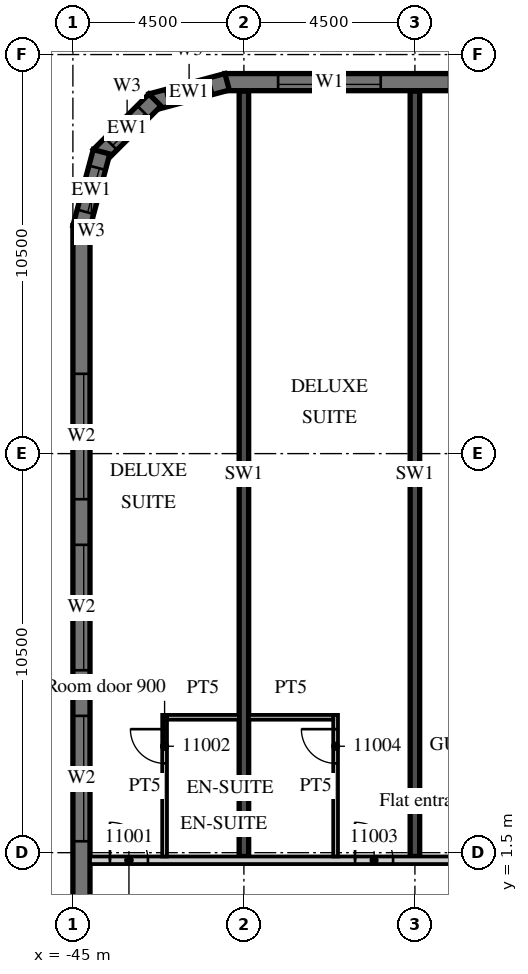
"""IFC4 building model, lengths in metres.
Left out: names, types, materials, properties, quantities, classifications, styles, units other than length and angle.
Written with IfcOpenShell. Run it as: python <this file> out.ifc"""

import sys

from ifc_helpers import new_model, si_unit, direction, frame, frame_2d, origin, place, context, subcontext, project, spatial, polyline, rectangle, outline, extrude, element, fill, save


model = new_model("IFC4")
c1 = context("Model", 3, precision=1e-05, world=origin(), true_north=direction((0.0, 1.0)))
c2 = subcontext(c1, "Body", "Model", "MODEL_VIEW")
j1 = project(units=[si_unit("LENGTHUNIT", "METRE"), si_unit("PLANEANGLEUNIT", "RADIAN")], contexts=[c1])
p1 = place(None, origin())
s1 = spatial("IfcSite", under=j1, at=p1, CompositionType="ELEMENT")
p2 = place(p1, origin())
s2 = spatial("IfcBuilding", under=s1, at=p2, CompositionType="ELEMENT")
p3 = place(p2, frame((0.0, 0.0, 66.6)))
s3 = spatial("IfcBuildingStorey", under=s2, at=p3, CompositionType="ELEMENT", Elevation=66.6)
for number, where, z_axis, x_axis in (
    (1, (-40.5, 1.4, 0.0), (0.0, 0.0, 1.0), (0.0, 1.0, 0.0)),
    (2, (-36.0, 1.4, 0.0), (0.0, 0.0, 1.0), (0.0, 1.0, 0.0)),
):
    element("IfcWall", number, at=place(p3, frame(where, z_axis=z_axis, x_axis=x_axis)), inside=s3, PredefinedType="SHEAR", context=c2, shape_type="SweptSolid", body=[
        extrude(rectangle(XDim=20.14, YDim=0.25, at=frame_2d((10.07, 0.0))), origin(), (0.0, 0.0, 1.0), 3.3),
    ])
p4 = place(p3, frame((13.5, 21.775, 0.0), z_axis=(0.0, 0.0, 1.0), x_axis=(-1.0, 0.0, 0.0)))
e3 = element("IfcWall", 3, at=p4, inside=s3, PredefinedType="SOLIDWALL", context=c2, shape_type="SweptSolid", body=[
    extrude(rectangle(XDim=54.5, YDim=0.45, at=frame_2d((27.25, 0.0))), origin(), (0.0, 0.0, 1.0), 3.02),
])
p5 = place(p4, frame((0.9, 0.0, 0.45)))
e4 = element("IfcOpeningElement", 4, at=p5, cuts=e3, PredefinedType="OPENING", context=c2, shape_type="SweptSolid", body=[
    extrude(rectangle(XDim=2.7, YDim=2.25, at=frame_2d((1.35, 1.125))), frame((0.0, 0.235, 0.0), z_axis=(0.0, -1.0, 0.0), x_axis=(1.0, 0.0, 0.0)), (0.0, 0.0, 1.0), 0.47),
])
p6 = place(p4, frame((5.4, 0.0, 0.45)))
e5 = element("IfcOpeningElement", 5, at=p6, cuts=e3, PredefinedType="OPENING", context=c2, shape_type="SweptSolid", body=[
    extrude(rectangle(XDim=2.7, YDim=2.25, at=frame_2d((1.35, 1.125))), frame((0.0, 0.235, 0.0), z_axis=(0.0, -1.0, 0.0), x_axis=(1.0, 0.0, 0.0)), (0.0, 0.0, 1.0), 0.47),
])
p7 = place(p4, frame((9.9, 0.0, 0.45)))
e6 = element("IfcOpeningElement", 6, at=p7, cuts=e3, PredefinedType="OPENING", context=c2, shape_type="SweptSolid", body=[
    extrude(rectangle(XDim=2.7, YDim=2.25, at=frame_2d((1.35, 1.125))), frame((0.0, 0.235, 0.0), z_axis=(0.0, -1.0, 0.0), x_axis=(1.0, 0.0, 0.0)), (0.0, 0.0, 1.0), 0.47),
])
p8 = place(p4, frame((14.4, 0.0, 0.45)))
e7 = element("IfcOpeningElement", 7, at=p8, cuts=e3, PredefinedType="OPENING", context=c2, shape_type="SweptSolid", body=[
    extrude(rectangle(XDim=2.7, YDim=2.25, at=frame_2d((1.35, 1.125))), frame((0.0, 0.235, 0.0), z_axis=(0.0, -1.0, 0.0), x_axis=(1.0, 0.0, 0.0)), (0.0, 0.0, 1.0), 0.47),
])
p9 = place(p4, frame((18.9, 0.0, 0.45)))
e8 = element("IfcOpeningElement", 8, at=p9, cuts=e3, PredefinedType="OPENING", context=c2, shape_type="SweptSolid", body=[
    extrude(rectangle(XDim=2.7, YDim=2.25, at=frame_2d((1.35, 1.125))), frame((0.0, 0.235, 0.0), z_axis=(0.0, -1.0, 0.0), x_axis=(1.0, 0.0, 0.0)), (0.0, 0.0, 1.0), 0.47),
])
p10 = place(p4, frame((23.4, 0.0, 0.45)))
e9 = element("IfcOpeningElement", 9, at=p10, cuts=e3, PredefinedType="OPENING", context=c2, shape_type="SweptSolid", body=[
    extrude(rectangle(XDim=2.7, YDim=2.25, at=frame_2d((1.35, 1.125))), frame((0.0, 0.235, 0.0), z_axis=(0.0, -1.0, 0.0), x_axis=(1.0, 0.0, 0.0)), (0.0, 0.0, 1.0), 0.47),
])
p11 = place(p4, frame((27.9, 0.0, 0.45)))
e10 = element("IfcOpeningElement", 10, at=p11, cuts=e3, PredefinedType="OPENING", context=c2, shape_type="SweptSolid", body=[
    extrude(rectangle(XDim=2.7, YDim=2.25, at=frame_2d((1.35, 1.125))), frame((0.0, 0.235, 0.0), z_axis=(0.0, -1.0, 0.0), x_axis=(1.0, 0.0, 0.0)), (0.0, 0.0, 1.0), 0.47),
])
p12 = place(p4, frame((32.4, 0.0, 0.45)))
e11 = element("IfcOpeningElement", 11, at=p12, cuts=e3, PredefinedType="OPENING", context=c2, shape_type="SweptSolid", body=[
    extrude(rectangle(XDim=2.7, YDim=2.25, at=frame_2d((1.35, 1.125))), frame((0.0, 0.235, 0.0), z_axis=(0.0, -1.0, 0.0), x_axis=(1.0, 0.0, 0.0)), (0.0, 0.0, 1.0), 0.47),
])
p13 = place(p4, frame((36.9, 0.0, 0.45)))
e12 = element("IfcOpeningElement", 12, at=p13, cuts=e3, PredefinedType="OPENING", context=c2, shape_type="SweptSolid", body=[
    extrude(rectangle(XDim=2.7, YDim=2.25, at=frame_2d((1.35, 1.125))), frame((0.0, 0.235, 0.0), z_axis=(0.0, -1.0, 0.0), x_axis=(1.0, 0.0, 0.0)), (0.0, 0.0, 1.0), 0.47),
])
p14 = place(p4, frame((41.4, 0.0, 0.45)))
e13 = element("IfcOpeningElement", 13, at=p14, cuts=e3, PredefinedType="OPENING", context=c2, shape_type="SweptSolid", body=[
    extrude(rectangle(XDim=2.7, YDim=2.25, at=frame_2d((1.35, 1.125))), frame((0.0, 0.235, 0.0), z_axis=(0.0, -1.0, 0.0), x_axis=(1.0, 0.0, 0.0)), (0.0, 0.0, 1.0), 0.47),
])
p15 = place(p4, frame((45.9, 0.0, 0.45)))
e14 = element("IfcOpeningElement", 14, at=p15, cuts=e3, PredefinedType="OPENING", context=c2, shape_type="SweptSolid", body=[
    extrude(rectangle(XDim=2.7, YDim=2.25, at=frame_2d((1.35, 1.125))), frame((0.0, 0.235, 0.0), z_axis=(0.0, -1.0, 0.0), x_axis=(1.0, 0.0, 0.0)), (0.0, 0.0, 1.0), 0.47),
])
p16 = place(p4, frame((50.4, 0.0, 0.45)))
e15 = element("IfcOpeningElement", 15, at=p16, cuts=e3, PredefinedType="OPENING", context=c2, shape_type="SweptSolid", body=[
    extrude(rectangle(XDim=2.7, YDim=2.25, at=frame_2d((1.35, 1.125))), frame((0.0, 0.235, 0.0), z_axis=(0.0, -1.0, 0.0), x_axis=(1.0, 0.0, 0.0)), (0.0, 0.0, 1.0), 0.47),
])
p17 = place(p3, frame((-40.942, 21.783, 0.0), z_axis=(0.0, 0.0, 1.0), x_axis=(-0.965926999034, -0.25881466832, 0.0)))
e16 = element("IfcWall", 16, at=p17, inside=s3, PredefinedType="SOLIDWALL", context=c2, shape_type="SweptSolid", body=[
    extrude(outline(polyline([(0.0, -0.225), (2.071, -0.225), (1.95, 0.225), (0.121, 0.225), (0.0, -0.225)])), origin(), (0.0, 0.0, 1.0), 3.02),
])
p18 = place(p17, frame((0.435, 0.0, 0.45)))
e17 = element("IfcOpeningElement", 17, at=p18, cuts=e16, PredefinedType="OPENING", context=c2, shape_type="SweptSolid", body=[
    extrude(rectangle(XDim=1.2, YDim=2.25, at=frame_2d((0.6, 1.125))), frame((0.0, 0.235, 0.0), z_axis=(0.0, -1.0, 0.0), x_axis=(1.0, 0.0, 0.0)), (0.0, 0.0, 1.0), 0.47),
])
p19 = place(p3, frame((-42.841, 21.305, 0.0), z_axis=(0.0, 0.0, 1.0), x_axis=(-0.707106781187, -0.707106781187, 0.0)))
e18 = element("IfcWall", 18, at=p19, inside=s3, PredefinedType="SOLIDWALL", context=c2, shape_type="SweptSolid", body=[
    extrude(outline(polyline([(0.0, -0.225), (2.071, -0.225), (1.95, 0.225), (0.121, 0.225), (0.0, -0.225)])), origin(), (0.0, 0.0, 1.0), 3.02),
])
p20 = place(p19, frame((0.435, 0.0, 0.45)))
e19 = element("IfcOpeningElement", 19, at=p20, cuts=e18, PredefinedType="OPENING", context=c2, shape_type="SweptSolid", body=[
    extrude(rectangle(XDim=1.2, YDim=2.25, at=frame_2d((0.6, 1.125))), frame((0.0, 0.235, 0.0), z_axis=(0.0, -1.0, 0.0), x_axis=(1.0, 0.0, 0.0)), (0.0, 0.0, 1.0), 0.47),
])
p21 = place(p3, frame((-44.247, 19.942, 0.0), z_axis=(0.0, 0.0, 1.0), x_axis=(-0.25881466832, -0.965926999034, 0.0)))
e20 = element("IfcWall", 20, at=p21, inside=s3, PredefinedType="SOLIDWALL", context=c2, shape_type="SweptSolid", body=[
    extrude(outline(polyline([(-0.0, -0.225), (2.07, -0.225), (1.95, 0.225), (0.12, 0.225), (-0.0, -0.225)])), origin(), (0.0, 0.0, 1.0), 3.02),
])
p22 = place(p21, frame((0.435, 0.0, 0.45)))
e21 = element("IfcOpeningElement", 21, at=p22, cuts=e20, PredefinedType="OPENING", context=c2, shape_type="SweptSolid", body=[
    extrude(rectangle(XDim=1.2, YDim=2.25, at=frame_2d((0.6, 1.125))), frame((0.0, 0.235, 0.0), z_axis=(0.0, -1.0, 0.0), x_axis=(1.0, 0.0, 0.0)), (0.0, 0.0, 1.0), 0.47),
])
p23 = place(p3, frame((-44.775, 18.0, 0.0), z_axis=(0.0, 0.0, 1.0), x_axis=(0.0, -1.0, 0.0)))
e22 = element("IfcWall", 22, at=p23, inside=s3, PredefinedType="SOLIDWALL", context=c2, shape_type="SweptSolid", body=[
    extrude(rectangle(XDim=36.0, YDim=0.45, at=frame_2d((18.0, 0.0))), origin(), (0.0, 0.0, 1.0), 3.02),
])
p24 = place(p23, frame((3.9, 0.0, 0.45)))
e23 = element("IfcOpeningElement", 23, at=p24, cuts=e22, PredefinedType="OPENING", context=c2, shape_type="SweptSolid", body=[
    extrude(rectangle(XDim=3.3, YDim=2.25, at=frame_2d((1.65, 1.125))), frame((0.0, 0.235, 0.0), z_axis=(0.0, -1.0, 0.0), x_axis=(1.0, 0.0, 0.0)), (0.0, 0.0, 1.0), 0.47),
])
p25 = place(p23, frame((8.4, 0.0, 0.45)))
e24 = element("IfcOpeningElement", 24, at=p25, cuts=e22, PredefinedType="OPENING", context=c2, shape_type="SweptSolid", body=[
    extrude(rectangle(XDim=3.3, YDim=2.25, at=frame_2d((1.65, 1.125))), frame((0.0, 0.235, 0.0), z_axis=(0.0, -1.0, 0.0), x_axis=(1.0, 0.0, 0.0)), (0.0, 0.0, 1.0), 0.47),
])
p26 = place(p23, frame((12.9, 0.0, 0.45)))
e25 = element("IfcOpeningElement", 25, at=p26, cuts=e22, PredefinedType="OPENING", context=c2, shape_type="SweptSolid", body=[
    extrude(rectangle(XDim=3.3, YDim=2.25, at=frame_2d((1.65, 1.125))), frame((0.0, 0.235, 0.0), z_axis=(0.0, -1.0, 0.0), x_axis=(1.0, 0.0, 0.0)), (0.0, 0.0, 1.0), 0.47),
])
p27 = place(p3, frame((-44.55, 1.3, 0.0), z_axis=(0.0, 0.0, 1.0), x_axis=(1.0, 0.0, 0.0)))
e26 = element("IfcWall", 26, at=p27, inside=s3, PredefinedType="PARTITIONING", context=c2, shape_type="SweptSolid", body=[
    extrude(rectangle(XDim=58.05, YDim=0.2, at=frame_2d((29.025, 0.0))), origin(), (0.0, 0.0, 1.0), 3.02),
])
p28 = place(p27, frame((0.525, 0.0, 0.0)))
e27 = element("IfcOpeningElement", 27, at=p28, cuts=e26, PredefinedType="OPENING", context=c2, shape_type="SweptSolid", body=[
    extrude(rectangle(XDim=1.0, YDim=2.1, at=frame_2d((0.5, 1.05))), frame((0.0, 0.11, 0.0), z_axis=(0.0, -1.0, 0.0), x_axis=(1.0, 0.0, 0.0)), (0.0, 0.0, 1.0), 0.22),
])
p29 = place(p27, frame((6.975, 0.0, 0.0)))
e28 = element("IfcOpeningElement", 28, at=p29, cuts=e26, PredefinedType="OPENING", context=c2, shape_type="SweptSolid", body=[
    extrude(rectangle(XDim=1.0, YDim=2.1, at=frame_2d((0.5, 1.05))), frame((0.0, 0.11, 0.0), z_axis=(0.0, -1.0, 0.0), x_axis=(1.0, 0.0, 0.0)), (0.0, 0.0, 1.0), 0.22),
])
p30 = place(p27, frame((10.987, 0.0, 0.0)))
e29 = element("IfcOpeningElement", 29, at=p30, cuts=e26, PredefinedType="OPENING", context=c2, shape_type="SweptSolid", body=[
    extrude(rectangle(XDim=1.2, YDim=2.1, at=frame_2d((0.6, 1.05))), frame((0.0, 0.11, 0.0), z_axis=(0.0, -1.0, 0.0), x_axis=(1.0, 0.0, 0.0)), (0.0, 0.0, 1.0), 0.22),
])
p31 = place(p27, frame((19.987, 0.0, 0.0)))
e30 = element("IfcOpeningElement", 30, at=p31, cuts=e26, PredefinedType="OPENING", context=c2, shape_type="SweptSolid", body=[
    extrude(rectangle(XDim=1.2, YDim=2.1, at=frame_2d((0.6, 1.05))), frame((0.0, 0.11, 0.0), z_axis=(0.0, -1.0, 0.0), x_axis=(1.0, 0.0, 0.0)), (0.0, 0.0, 1.0), 0.22),
])
p32 = place(p27, frame((29.5, 0.0, 0.0)))
e31 = element("IfcOpeningElement", 31, at=p32, cuts=e26, PredefinedType="OPENING", context=c2, shape_type="SweptSolid", body=[
    extrude(rectangle(XDim=1.0, YDim=2.1, at=frame_2d((0.5, 1.05))), frame((0.0, 0.11, 0.0), z_axis=(0.0, -1.0, 0.0), x_axis=(1.0, 0.0, 0.0)), (0.0, 0.0, 1.0), 0.22),
])
p33 = place(p27, frame((33.975, 0.0, 0.0)))
e32 = element("IfcOpeningElement", 32, at=p33, cuts=e26, PredefinedType="OPENING", context=c2, shape_type="SweptSolid", body=[
    extrude(rectangle(XDim=1.0, YDim=2.1, at=frame_2d((0.5, 1.05))), frame((0.0, 0.11, 0.0), z_axis=(0.0, -1.0, 0.0), x_axis=(1.0, 0.0, 0.0)), (0.0, 0.0, 1.0), 0.22),
])
p34 = place(p27, frame((40.912, 0.0, 0.0)))
e33 = element("IfcOpeningElement", 33, at=p34, cuts=e26, PredefinedType="OPENING", context=c2, shape_type="SweptSolid", body=[
    extrude(rectangle(XDim=1.2, YDim=2.1, at=frame_2d((0.6, 1.05))), frame((0.0, 0.11, 0.0), z_axis=(0.0, -1.0, 0.0), x_axis=(1.0, 0.0, 0.0)), (0.0, 0.0, 1.0), 0.22),
])
p35 = place(p27, frame((47.5, 0.0, 0.0)))
e34 = element("IfcOpeningElement", 34, at=p35, cuts=e26, PredefinedType="OPENING", context=c2, shape_type="SweptSolid", body=[
    extrude(rectangle(XDim=1.0, YDim=2.1, at=frame_2d((0.5, 1.05))), frame((0.0, 0.11, 0.0), z_axis=(0.0, -1.0, 0.0), x_axis=(1.0, 0.0, 0.0)), (0.0, 0.0, 1.0), 0.22),
])
p36 = place(p27, frame((51.975, 0.0, 0.0)))
e35 = element("IfcOpeningElement", 35, at=p36, cuts=e26, PredefinedType="OPENING", context=c2, shape_type="SweptSolid", body=[
    extrude(rectangle(XDim=1.0, YDim=2.1, at=frame_2d((0.5, 1.05))), frame((0.0, 0.11, 0.0), z_axis=(0.0, -1.0, 0.0), x_axis=(1.0, 0.0, 0.0)), (0.0, 0.0, 1.0), 0.22),
])
p37 = place(p27, frame((56.475, 0.0, 0.0)))
e36 = element("IfcOpeningElement", 36, at=p37, cuts=e26, PredefinedType="OPENING", context=c2, shape_type="SweptSolid", body=[
    extrude(rectangle(XDim=1.0, YDim=2.1, at=frame_2d((0.5, 1.05))), frame((0.0, 0.11, 0.0), z_axis=(0.0, -1.0, 0.0), x_axis=(1.0, 0.0, 0.0)), (0.0, 0.0, 1.0), 0.22),
])
p38 = place(p3, frame((-42.587, 1.4, 0.0), z_axis=(0.0, 0.0, 1.0), x_axis=(0.0, 1.0, 0.0)))
e37 = element("IfcWall", 37, at=p38, inside=s3, PredefinedType="PARTITIONING", context=c2, shape_type="SweptSolid", body=[
    extrude(rectangle(XDim=3.725, YDim=0.125, at=frame_2d((1.863, 0.0))), origin(), (0.0, 0.0, 1.0), 3.02),
])
p39 = place(p38, frame((2.45, 0.0, 0.0)))
e38 = element("IfcOpeningElement", 38, at=p39, cuts=e37, PredefinedType="OPENING", context=c2, shape_type="SweptSolid", body=[
    extrude(rectangle(XDim=0.9, YDim=2.1, at=frame_2d((0.45, 1.05))), frame((0.0, 0.073, 0.0), z_axis=(0.0, -1.0, 0.0), x_axis=(1.0, 0.0, 0.0)), (0.0, 0.0, 1.0), 0.145),
])
p40 = place(p3, frame((-42.525, 5.062, 0.0), z_axis=(0.0, 0.0, 1.0), x_axis=(1.0, 0.0, 0.0)))
e39 = element("IfcWall", 39, at=p40, inside=s3, PredefinedType="PARTITIONING", context=c2, shape_type="SweptSolid", body=[
    extrude(rectangle(XDim=1.9, YDim=0.125, at=frame_2d((0.95, 0.0))), origin(), (0.0, 0.0, 1.0), 3.02),
])
p41 = place(p3, frame((-38.087, 1.4, 0.0), z_axis=(0.0, 0.0, 1.0), x_axis=(0.0, 1.0, 0.0)))
e40 = element("IfcWall", 40, at=p41, inside=s3, PredefinedType="PARTITIONING", context=c2, shape_type="SweptSolid", body=[
    extrude(rectangle(XDim=3.725, YDim=0.125, at=frame_2d((1.863, 0.0))), origin(), (0.0, 0.0, 1.0), 3.02),
])
p42 = place(p41, frame((2.45, 0.0, 0.0)))
e41 = element("IfcOpeningElement", 41, at=p42, cuts=e40, PredefinedType="OPENING", context=c2, shape_type="SweptSolid", body=[
    extrude(rectangle(XDim=0.9, YDim=2.1, at=frame_2d((0.45, 1.05))), frame((0.0, 0.073, 0.0), z_axis=(0.0, -1.0, 0.0), x_axis=(1.0, 0.0, 0.0)), (0.0, 0.0, 1.0), 0.145),
])
p43 = place(p3, frame((-40.375, 5.062, 0.0), z_axis=(0.0, 0.0, 1.0), x_axis=(1.0, 0.0, 0.0)))
e42 = element("IfcWall", 42, at=p43, inside=s3, PredefinedType="PARTITIONING", context=c2, shape_type="SweptSolid", body=[
    extrude(rectangle(XDim=2.225, YDim=0.125, at=frame_2d((1.113, 0.0))), origin(), (0.0, 0.0, 1.0), 3.02),
])
p44 = place(p16, origin())
e43 = element("IfcWindow", 43, at=p44, inside=s3, PartitioningType="SINGLE_PANEL", PredefinedType="WINDOW", context=c2, shape_type="SweptSolid", body=[
    extrude(rectangle(XDim=2.7, YDim=2.25, at=frame_2d((1.35, 1.125))), frame((0.0, 0.09, 0.0), z_axis=(0.0, -1.0, 0.0), x_axis=(1.0, 0.0, 0.0)), (0.0, 0.0, 1.0), 0.06),
])
fill(e15, e43)
p45 = place(p18, origin())
e44 = element("IfcWindow", 44, at=p45, inside=s3, PartitioningType="SINGLE_PANEL", PredefinedType="WINDOW", context=c2, shape_type="SweptSolid", body=[
    extrude(rectangle(XDim=1.2, YDim=2.25, at=frame_2d((0.6, 1.125))), frame((0.0, 0.09, 0.0), z_axis=(0.0, -1.0, 0.0), x_axis=(1.0, 0.0, 0.0)), (0.0, 0.0, 1.0), 0.06),
])
fill(e17, e44)
p46 = place(p20, origin())
e45 = element("IfcWindow", 45, at=p46, inside=s3, PartitioningType="SINGLE_PANEL", PredefinedType="WINDOW", context=c2, shape_type="SweptSolid", body=[
    extrude(rectangle(XDim=1.2, YDim=2.25, at=frame_2d((0.6, 1.125))), frame((0.0, 0.09, 0.0), z_axis=(0.0, -1.0, 0.0), x_axis=(1.0, 0.0, 0.0)), (0.0, 0.0, 1.0), 0.06),
])
fill(e19, e45)
p47 = place(p22, origin())
e46 = element("IfcWindow", 46, at=p47, inside=s3, PartitioningType="SINGLE_PANEL", PredefinedType="WINDOW", context=c2, shape_type="SweptSolid", body=[
    extrude(rectangle(XDim=1.2, YDim=2.25, at=frame_2d((0.6, 1.125))), frame((0.0, 0.09, 0.0), z_axis=(0.0, -1.0, 0.0), x_axis=(1.0, 0.0, 0.0)), (0.0, 0.0, 1.0), 0.06),
])
fill(e21, e46)
p48 = place(p24, origin())
e47 = element("IfcWindow", 47, at=p48, inside=s3, PartitioningType="SINGLE_PANEL", PredefinedType="WINDOW", context=c2, shape_type="SweptSolid", body=[
    extrude(rectangle(XDim=3.3, YDim=2.25, at=frame_2d((1.65, 1.125))), frame((0.0, 0.09, 0.0), z_axis=(0.0, -1.0, 0.0), x_axis=(1.0, 0.0, 0.0)), (0.0, 0.0, 1.0), 0.06),
])
fill(e23, e47)
p49 = place(p25, origin())
e48 = element("IfcWindow", 48, at=p49, inside=s3, PartitioningType="SINGLE_PANEL", PredefinedType="WINDOW", context=c2, shape_type="SweptSolid", body=[
    extrude(rectangle(XDim=3.3, YDim=2.25, at=frame_2d((1.65, 1.125))), frame((0.0, 0.09, 0.0), z_axis=(0.0, -1.0, 0.0), x_axis=(1.0, 0.0, 0.0)), (0.0, 0.0, 1.0), 0.06),
])
fill(e24, e48)
p50 = place(p26, origin())
e49 = element("IfcWindow", 49, at=p50, inside=s3, PartitioningType="SINGLE_PANEL", PredefinedType="WINDOW", context=c2, shape_type="SweptSolid", body=[
    extrude(rectangle(XDim=3.3, YDim=2.25, at=frame_2d((1.65, 1.125))), frame((0.0, 0.09, 0.0), z_axis=(0.0, -1.0, 0.0), x_axis=(1.0, 0.0, 0.0)), (0.0, 0.0, 1.0), 0.06),
])
fill(e25, e49)
p51 = place(p28, origin())
e50 = element("IfcDoor", 50, at=p51, inside=s3, OperationType="SINGLE_SWING_LEFT", PredefinedType="DOOR", context=c2, shape_type="SweptSolid", body=[
    extrude(rectangle(XDim=1.0, YDim=2.1, at=frame_2d((0.5, 1.05))), frame((0.0, 0.025, 0.0), z_axis=(0.0, -1.0, 0.0), x_axis=(1.0, 0.0, 0.0)), (0.0, 0.0, 1.0), 0.05),
])
fill(e27, e50)
p52 = place(p39, origin())
e51 = element("IfcDoor", 51, at=p52, inside=s3, OperationType="SINGLE_SWING_RIGHT", PredefinedType="DOOR", context=c2, shape_type="SweptSolid", body=[
    extrude(rectangle(XDim=0.9, YDim=2.1, at=frame_2d((0.45, 1.05))), frame((0.0, 0.025, 0.0), z_axis=(0.0, -1.0, 0.0), x_axis=(1.0, 0.0, 0.0)), (0.0, 0.0, 1.0), 0.05),
])
fill(e38, e51)
p53 = place(p29, origin())
e52 = element("IfcDoor", 52, at=p53, inside=s3, OperationType="SINGLE_SWING_LEFT", PredefinedType="DOOR", context=c2, shape_type="SweptSolid", body=[
    extrude(rectangle(XDim=1.0, YDim=2.1, at=frame_2d((0.5, 1.05))), frame((0.0, 0.025, 0.0), z_axis=(0.0, -1.0, 0.0), x_axis=(1.0, 0.0, 0.0)), (0.0, 0.0, 1.0), 0.05),
])
fill(e28, e52)
p54 = place(p42, origin())
e53 = element("IfcDoor", 53, at=p54, inside=s3, OperationType="SINGLE_SWING_RIGHT", PredefinedType="DOOR", context=c2, shape_type="SweptSolid", body=[
    extrude(rectangle(XDim=0.9, YDim=2.1, at=frame_2d((0.45, 1.05))), frame((0.0, 0.025, 0.0), z_axis=(0.0, -1.0, 0.0), x_axis=(1.0, 0.0, 0.0)), (0.0, 0.0, 1.0), 0.05),
])
fill(e41, e53)
save(model, sys.argv[1])
